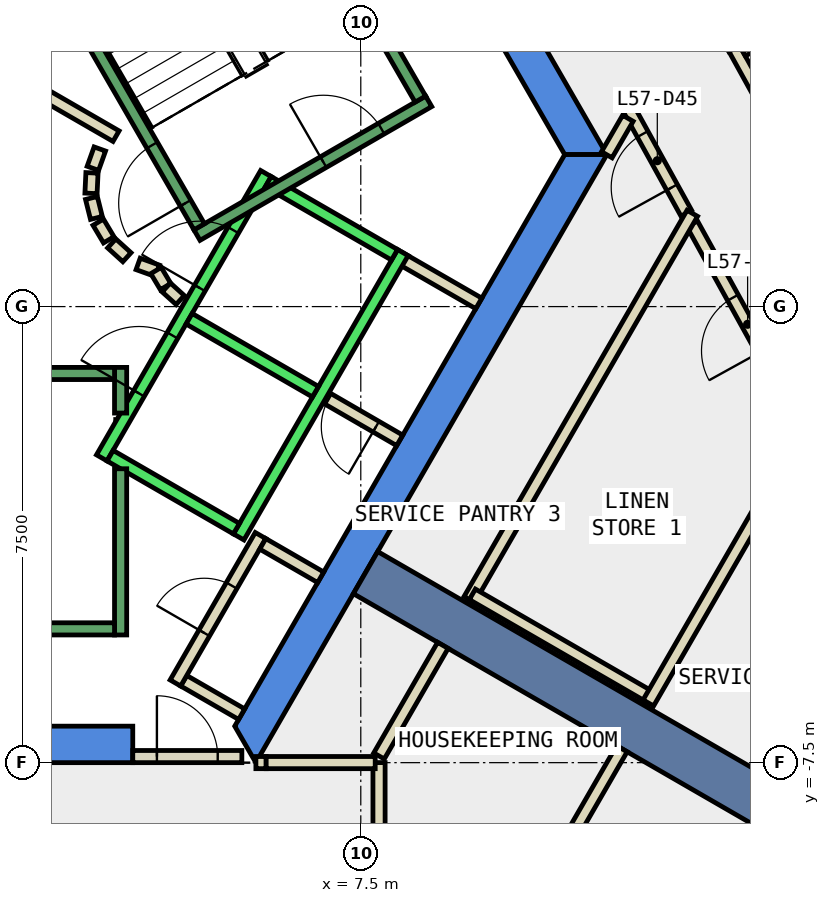
"""IFC4 building model, lengths in metres.
Left out: names, types, materials, properties, quantities, classifications, styles, units other than length and angle.
Written with IfcOpenShell. Run it as: python <this file> out.ifc"""

import sys

from ifc_helpers import new_model, si_unit, direction, frame, frame_2d, origin, place, context, subcontext, project, spatial, polyline, rectangle, outline, extrude, element, fill, save


model = new_model("IFC4")
c1 = context("Model", 3, precision=1e-05, world=origin(), true_north=direction((0.0, 1.0)))
c2 = subcontext(c1, "Body", "Model", "MODEL_VIEW")
j1 = project(units=[si_unit("LENGTHUNIT", "METRE"), si_unit("PLANEANGLEUNIT", "RADIAN")], contexts=[c1])
p1 = place(None, origin())
s1 = spatial("IfcSite", under=j1, at=p1, CompositionType="ELEMENT")
p2 = place(p1, origin())
s2 = spatial("IfcBuilding", under=s1, at=p2, CompositionType="ELEMENT")
p3 = place(p2, frame((0.0, 0.0, 252.2)))
s3 = spatial("IfcBuildingStorey", under=s2, at=p3, CompositionType="ELEMENT", Elevation=252.2)
p4 = place(p3, frame((0.0, 0.0, -0.34)))
e1 = element("IfcWall", 1, at=p4, inside=s3, PredefinedType="SHEAR", context=c2, shape_type="SweptSolid", body=[
    extrude(outline(polyline([(6.786, 10.747), (6.266, 10.447), (10.854, 2.5), (11.547, 2.5), (6.786, 10.747)])), origin(), (0.0, 0.0, 1.0), 3.6),
])
p5 = place(p3, frame((0.0, 0.0, -0.34)))
e2 = element("IfcWall", 2, at=p5, inside=s3, PredefinedType="SHEAR", context=c2, shape_type="SweptSolid", body=[
    extrude(outline(polyline([(3.75, -7.5), (3.75, -6.9), (-5.427, -6.9), (-5.774, -7.5), (3.75, -7.5)])), origin(), (0.0, 0.0, 1.0), 3.6),
])
p6 = place(p3, frame((0.0, 0.0, -0.34)))
e3 = element("IfcWall", 3, at=p6, inside=s3, PredefinedType="SHEAR", context=c2, shape_type="SweptSolid", body=[
    extrude(outline(polyline([(5.774, -7.5), (11.547, 2.5), (10.854, 2.5), (5.427, -6.9), (5.774, -7.5)])), origin(), (0.0, 0.0, 1.0), 3.6),
])
p7 = place(p3, frame((7.578, -4.375, -0.34), z_axis=(0.0, 0.0, 1.0), x_axis=(0.866024315419, -0.5000018851, 0.0)))
e4 = element("IfcWall", 4, at=p7, inside=s3, PredefinedType="SHEAR", context=c2, shape_type="SweptSolid", body=[
    extrude(rectangle(XDim=9.0, YDim=0.8, at=frame_2d((4.5, 0.0))), origin(), (0.0, 0.0, 1.0), 3.6),
])
p8 = place(p3, frame((12.854, 1.535, 0.0), z_axis=(0.0, 0.0, 1.0), x_axis=(-0.483730980407, 0.875216738068, 0.0)))
e5 = element("IfcWall", 5, at=p8, inside=s3, PredefinedType="PARTITIONING", context=c2, shape_type="SweptSolid", body=[
    extrude(rectangle(XDim=1.974, YDim=0.2, at=frame_2d((0.987, 0.0))), origin(), (0.0, 0.0, 1.0), 3.26),
])
p9 = place(p8, frame((0.487, 0.0, 0.0)))
e6 = element("IfcOpeningElement", 6, at=p9, cuts=e5, PredefinedType="OPENING", context=c2, shape_type="SweptSolid", body=[
    extrude(rectangle(XDim=1.0, YDim=2.1, at=frame_2d((0.5, 1.05))), frame((0.0, 0.11, 0.0), z_axis=(0.0, -1.0, 0.0), x_axis=(1.0, 0.0, 0.0)), (0.0, 0.0, 1.0), 0.22),
])
p10 = place(p3, frame((11.893, 3.097, 0.0), z_axis=(0.0, 0.0, 1.0), x_axis=(-0.500911294014, -0.865498628265, 0.0)))
e7 = element("IfcWall", 7, at=p10, inside=s3, PredefinedType="PARTITIONING", context=c2, shape_type="SweptSolid", body=[
    extrude(rectangle(XDim=0.693, YDim=0.2, at=frame_2d((0.347, 0.0))), origin(), (0.0, 0.0, 1.0), 3.26),
])
p11 = place(p3, frame((14.773, -1.941, 0.0), z_axis=(0.0, 0.0, 1.0), x_axis=(-0.483431586589, 0.875382145744, 0.0)))
e8 = element("IfcWall", 8, at=p11, inside=s3, PredefinedType="PARTITIONING", context=c2, shape_type="SweptSolid", body=[
    extrude(rectangle(XDim=3.771, YDim=0.2, at=frame_2d((1.885, 0.0))), origin(), (0.0, 0.0, 1.0), 3.26),
])
p12 = place(p11, frame((1.385, 0.0, 0.0)))
e9 = element("IfcOpeningElement", 9, at=p12, cuts=e8, PredefinedType="OPENING", context=c2, shape_type="SweptSolid", body=[
    extrude(rectangle(XDim=1.0, YDim=2.1, at=frame_2d((0.5, 1.05))), frame((0.0, 0.11, 0.0), z_axis=(0.0, -1.0, 0.0), x_axis=(1.0, 0.0, 0.0)), (0.0, 0.0, 1.0), 0.22),
])
p13 = place(p3, frame((13.641, 4.246, 0.0), z_axis=(0.0, 0.0, 1.0), x_axis=(0.483405752983, -0.875396411909, 0.0)))
e10 = element("IfcWall", 10, at=p13, inside=s3, PredefinedType="PARTITIONING", context=c2, shape_type="SweptSolid", body=[
    extrude(rectangle(XDim=4.284, YDim=0.2, at=frame_2d((2.142, 0.0))), origin(), (0.0, 0.0, 1.0), 3.26),
])
p14 = place(p13, frame((1.692, 0.0, 0.0)))
e11 = element("IfcOpeningElement", 11, at=p14, cuts=e10, PredefinedType="OPENING", context=c2, shape_type="SweptSolid", body=[
    extrude(rectangle(XDim=1.0, YDim=2.1, at=frame_2d((0.5, 1.05))), frame((0.0, 0.11, 0.0), z_axis=(0.0, -1.0, 0.0), x_axis=(1.0, 0.0, 0.0)), (0.0, 0.0, 1.0), 0.22),
])
p15 = place(p3, frame((5.541, -6.703, 0.0), z_axis=(0.0, 0.0, 1.0), x_axis=(-0.86621513555, 0.499671230855, 0.0)))
e12 = element("IfcWall", 12, at=p15, inside=s3, PredefinedType="PARTITIONING", context=c2, shape_type="SweptSolid", body=[
    extrude(rectangle(XDim=1.1, YDim=0.2, at=frame_2d((0.55, 0.0))), origin(), (0.0, 0.0, 1.0), 3.26),
])
p16 = place(p3, frame((4.451, -6.19, 0.0), z_axis=(0.0, 0.0, 1.0), x_axis=(0.500011755427, 0.866018616679, 0.0)))
e13 = element("IfcWall", 13, at=p16, inside=s3, PredefinedType="PARTITIONING", context=c2, shape_type="SweptSolid", body=[
    extrude(rectangle(XDim=2.8, YDim=0.2, at=frame_2d((1.4, 0.0))), origin(), (0.0, 0.0, 1.0), 3.26),
])
p17 = place(p16, frame((0.95, 0.0, 0.0)))
e14 = element("IfcOpeningElement", 14, at=p17, cuts=e13, PredefinedType="OPENING", context=c2, shape_type="SweptSolid", body=[
    extrude(rectangle(XDim=0.9, YDim=2.1, at=frame_2d((0.45, 1.05))), frame((0.0, 0.11, 0.0), z_axis=(0.0, -1.0, 0.0), x_axis=(1.0, 0.0, 0.0)), (0.0, 0.0, 1.0), 0.22),
])
p18 = place(p3, frame((5.888, -3.902, 0.0), z_axis=(0.0, 0.0, 1.0), x_axis=(0.86621513555, -0.499671230855, 0.0)))
e15 = element("IfcWall", 15, at=p18, inside=s3, PredefinedType="PARTITIONING", context=c2, shape_type="SweptSolid", body=[
    extrude(rectangle(XDim=1.1, YDim=0.2, at=frame_2d((0.55, 0.0))), origin(), (0.0, 0.0, 1.0), 3.26),
])
p19 = place(p3, frame((8.14, -2.2, 0.0), z_axis=(0.0, 0.0, 1.0), x_axis=(-0.865545166185, 0.500830874941, 0.0)))
e16 = element("IfcWall", 16, at=p19, inside=s3, PredefinedType="PARTITIONING", context=c2, shape_type="SweptSolid", body=[
    extrude(rectangle(XDim=1.5, YDim=0.2, at=frame_2d((0.75, 0.0))), origin(), (0.0, 0.0, 1.0), 3.26),
])
p20 = place(p19, frame((0.45, 0.0, 0.0)))
e17 = element("IfcOpeningElement", 17, at=p20, cuts=e16, PredefinedType="OPENING", context=c2, shape_type="SweptSolid", body=[
    extrude(rectangle(XDim=0.9, YDim=2.1, at=frame_2d((0.45, 1.05))), frame((0.0, 0.11, 0.0), z_axis=(0.0, -1.0, 0.0), x_axis=(1.0, 0.0, 0.0)), (0.0, 0.0, 1.0), 0.22),
])
p21 = place(p3, frame((8.141, 0.801, 0.0), z_axis=(0.0, 0.0, 1.0), x_axis=(0.866434738017, -0.499290341141, 0.0)))
e18 = element("IfcWall", 18, at=p21, inside=s3, PredefinedType="PARTITIONING", context=c2, shape_type="SweptSolid", body=[
    extrude(rectangle(XDim=1.5, YDim=0.2, at=frame_2d((0.75, 0.0))), origin(), (0.0, 0.0, 1.0), 3.26),
])
p22 = place(p3, frame((5.775, -7.499, 0.0), z_axis=(0.0, 0.0, 1.0), x_axis=(1.0, 0.0, 0.0)))
e19 = element("IfcWall", 19, at=p22, inside=s3, PredefinedType="PARTITIONING", context=c2, shape_type="SweptSolid", body=[
    extrude(rectangle(XDim=0.169, YDim=0.2, at=frame_2d((0.084, 0.0))), origin(), (0.0, 0.0, 1.0), 2.4),
])
p23 = place(p3, frame((7.8, -7.39, 0.0), z_axis=(0.0, 0.0, 1.0), x_axis=(0.499977374825, 0.866038466041, 0.0)))
e20 = element("IfcWall", 20, at=p23, inside=s3, PredefinedType="PARTITIONING", context=c2, shape_type="SweptSolid", body=[
    extrude(rectangle(XDim=2.1, YDim=0.2, at=frame_2d((1.05, 0.0))), origin(), (0.0, 0.0, 1.0), 3.26),
])
p24 = place(p3, frame((9.285, -4.818, 0.0), z_axis=(0.0, 0.0, 1.0), x_axis=(0.499962569651, 0.866047013128, 0.0)))
e21 = element("IfcWall", 21, at=p24, inside=s3, PredefinedType="PARTITIONING", context=c2, shape_type="SweptSolid", body=[
    extrude(rectangle(XDim=7.334, YDim=0.2, at=frame_2d((3.667, 0.0))), origin(), (0.0, 0.0, 1.0), 3.26),
])
p25 = place(p3, frame((1.866, 3.732, 0.0), z_axis=(0.0, 0.0, 1.0), x_axis=(0.866043361281, -0.499968895414, 0.0)))
e22 = element("IfcWall", 22, at=p25, inside=s3, PredefinedType="PARTITIONING", context=c2, shape_type="SweptSolid", body=[
    extrude(rectangle(XDim=1.858, YDim=0.2, at=frame_2d((0.929, 0.0))), origin(), (0.0, 0.0, 1.0), 3.26),
])
p26 = place(p3, frame((3.208, 2.592, 0.0), z_axis=(0.0, 0.0, 1.0), x_axis=(-0.337388820924, -0.941365382578, 0.0)))
e23 = element("IfcWall", 23, at=p26, inside=s3, PredefinedType="PARTITIONING", context=c2, shape_type="SweptSolid", body=[
    extrude(rectangle(XDim=0.338, YDim=0.2, at=frame_2d((0.169, 0.0))), origin(), (0.0, 0.0, 1.0), 3.26),
])
p27 = place(p3, frame((3.079, 2.199, 0.0), z_axis=(0.0, 0.0, 1.0), x_axis=(-0.047771483479, -0.998858290933, 0.0)))
e24 = element("IfcWall", 24, at=p27, inside=s3, PredefinedType="PARTITIONING", context=c2, shape_type="SweptSolid", body=[
    extrude(rectangle(XDim=0.337, YDim=0.2, at=frame_2d((0.169, 0.0))), origin(), (0.0, 0.0, 1.0), 3.26),
])
p28 = place(p3, frame((3.07, 1.786, 0.0), z_axis=(0.0, 0.0, 1.0), x_axis=(0.242705583207, -0.970099994784, 0.0)))
e25 = element("IfcWall", 25, at=p28, inside=s3, PredefinedType="PARTITIONING", context=c2, shape_type="SweptSolid", body=[
    extrude(rectangle(XDim=0.338, YDim=0.2, at=frame_2d((0.169, 0.0))), origin(), (0.0, 0.0, 1.0), 3.26),
])
for number, where, z_axis, x_axis in (
    (26, (3.182, 1.388, 0.0), (0.0, 0.0, 1.0), (0.512, -0.859, 0.0)),
    (27, (3.404, 1.039, 0.0), (0.0, 0.0, 1.0), (0.74, -0.672, 0.0)),
):
    element("IfcWall", number, at=place(p3, frame(where, z_axis=z_axis, x_axis=x_axis)), inside=s3, PredefinedType="PARTITIONING", context=c2, shape_type="SweptSolid", body=[
        extrude(rectangle(XDim=0.338, YDim=0.2, at=frame_2d((0.169, 0.0))), origin(), (0.0, 0.0, 1.0), 3.26),
    ])
p29 = place(p3, frame((3.838, 0.702, 0.0), z_axis=(0.0, 0.0, 1.0), x_axis=(0.941035081519, -0.338308993895, 0.0)))
e28 = element("IfcWall", 28, at=p29, inside=s3, PredefinedType="PARTITIONING", context=c2, shape_type="SweptSolid", body=[
    extrude(rectangle(XDim=0.337, YDim=0.2, at=frame_2d((0.168, 0.0))), origin(), (0.0, 0.0, 1.0), 3.26),
])
p30 = place(p3, frame((4.132, 0.593, 0.0), z_axis=(0.0, 0.0, 1.0), x_axis=(0.513561617048, -0.858052717201, 0.0)))
e29 = element("IfcWall", 29, at=p30, inside=s3, PredefinedType="PARTITIONING", context=c2, shape_type="SweptSolid", body=[
    extrude(rectangle(XDim=0.308, YDim=0.2, at=frame_2d((0.154, 0.0))), origin(), (0.0, 0.0, 1.0), 3.26),
])
p31 = place(p3, frame((4.301, 0.315, 0.0), z_axis=(0.0, 0.0, 1.0), x_axis=(0.741798017506, -0.670623367639, 0.0)))
e30 = element("IfcWall", 30, at=p31, inside=s3, PredefinedType="PARTITIONING", context=c2, shape_type="SweptSolid", body=[
    extrude(rectangle(XDim=0.309, YDim=0.2, at=frame_2d((0.154, 0.0))), origin(), (0.0, 0.0, 1.0), 3.26),
])
p32 = place(p3, frame((7.8, -7.499, 0.0), z_axis=(0.0, 0.0, 1.0), x_axis=(0.0, -1.0, 0.0)))
e31 = element("IfcWall", 31, at=p32, inside=s3, PredefinedType="PARTITIONING", context=c2, shape_type="SweptSolid", body=[
    extrude(rectangle(XDim=4.685, YDim=0.2, at=frame_2d((2.343, 0.0))), origin(), (0.0, 0.0, 1.0), 3.26),
])
p33 = place(p32, frame((1.842, 0.0, 0.0)))
e32 = element("IfcOpeningElement", 32, at=p33, cuts=e31, PredefinedType="OPENING", context=c2, shape_type="SweptSolid", body=[
    extrude(rectangle(XDim=1.0, YDim=2.1, at=frame_2d((0.5, 1.05))), frame((0.0, 0.11, 0.0), z_axis=(0.0, -1.0, 0.0), x_axis=(1.0, 0.0, 0.0)), (0.0, 0.0, 1.0), 0.22),
])
p34 = place(p3, frame((9.335, -4.732, 0.0), z_axis=(0.0, 0.0, 1.0), x_axis=(0.866002606077, -0.500039484709, 0.0)))
e33 = element("IfcWall", 33, at=p34, inside=s3, PredefinedType="PARTITIONING", context=c2, shape_type="SweptSolid", body=[
    extrude(rectangle(XDim=3.4, YDim=0.2, at=frame_2d((1.7, 0.0))), origin(), (0.0, 0.0, 1.0), 3.26),
])
p35 = place(p3, frame((11.794, -7.271, 0.0), z_axis=(0.0, 0.0, 1.0), x_axis=(-0.499918457185, -0.866072477433, 0.0)))
e34 = element("IfcWall", 34, at=p35, inside=s3, PredefinedType="PARTITIONING", context=c2, shape_type="SweptSolid", body=[
    extrude(rectangle(XDim=5.607, YDim=0.2, at=frame_2d((2.803, 0.0))), origin(), (0.0, 0.0, 1.0), 3.26),
])
p36 = place(p3, frame((14.871, -1.942, 0.0), z_axis=(0.0, 0.0, 1.0), x_axis=(-0.50000507839, -0.866022471755, 0.0)))
e35 = element("IfcWall", 35, at=p36, inside=s3, PredefinedType="PARTITIONING", context=c2, shape_type="SweptSolid", body=[
    extrude(rectangle(XDim=5.284, YDim=0.2, at=frame_2d((2.642, 0.0))), origin(), (0.0, 0.0, 1.0), 3.26),
])
p37 = place(p3, frame((13.776, 4.208, 0.0), z_axis=(0.0, 0.0, 1.0), x_axis=(0.870669592898, 0.491868336044, 0.0)))
e36 = element("IfcWall", 36, at=p37, inside=s3, PredefinedType="PARTITIONING", context=c2, shape_type="SweptSolid", body=[
    extrude(rectangle(XDim=2.3, YDim=0.2, at=frame_2d((1.15, 0.0))), origin(), (0.0, 0.0, 1.0), 3.26),
])
p38 = place(p3, frame((3.75, -7.4, 0.0), z_axis=(0.0, 0.0, 1.0), x_axis=(1.0, 0.0, 0.0)))
e37 = element("IfcWall", 37, at=p38, inside=s3, PredefinedType="PARTITIONING", context=c2, shape_type="SweptSolid", body=[
    extrude(rectangle(XDim=1.794, YDim=0.2, at=frame_2d((0.897, 0.0))), origin(), (0.0, 0.0, 1.0), 2.4),
])
p39 = place(p38, frame((0.397, 0.0, 0.0)))
e38 = element("IfcOpeningElement", 38, at=p39, cuts=e37, PredefinedType="OPENING", context=c2, shape_type="SweptSolid", body=[
    extrude(rectangle(XDim=1.0, YDim=2.1, at=frame_2d((0.5, 1.05))), frame((0.0, 0.11, 0.0), z_axis=(0.0, -1.0, 0.0), x_axis=(1.0, 0.0, 0.0)), (0.0, 0.0, 1.0), 0.22),
])
p40 = place(p3, frame((5.944, -7.499, 0.0), z_axis=(0.0, 0.0, 1.0), x_axis=(1.0, 0.0, 0.0)))
e39 = element("IfcWall", 39, at=p40, inside=s3, PredefinedType="PARTITIONING", context=c2, shape_type="SweptSolid", body=[
    extrude(rectangle(XDim=1.793, YDim=0.2, at=frame_2d((0.896, 0.0))), origin(), (0.0, 0.0, 1.0), 3.26),
])
p41 = place(p3, frame((3.24, -2.488, 0.0), z_axis=(0.0, 0.0, 1.0), x_axis=(0.500034260056, 0.866005622828, 0.0)))
e40 = element("IfcWall", 40, at=p41, inside=s3, PredefinedType="STANDARD", context=c2, shape_type="SweptSolid", body=[
    extrude(rectangle(XDim=5.399, YDim=0.2, at=frame_2d((2.7, 0.0))), origin(), (0.0, 0.0, 1.0), 3.26),
])
p42 = place(p41, frame((3.225, 0.0, 0.0)))
e41 = element("IfcOpeningElement", 41, at=p42, cuts=e40, PredefinedType="OPENING", context=c2, shape_type="SweptSolid", body=[
    extrude(rectangle(XDim=1.1, YDim=2.1, at=frame_2d((0.55, 1.05))), frame((0.0, 0.11, 0.0), z_axis=(0.0, -1.0, 0.0), x_axis=(1.0, 0.0, 0.0)), (0.0, 0.0, 1.0), 0.22),
])
p43 = place(p41, frame((1.225, 0.0, 0.0)))
e42 = element("IfcOpeningElement", 42, at=p43, cuts=e40, PredefinedType="OPENING", context=c2, shape_type="SweptSolid", body=[
    extrude(rectangle(XDim=1.1, YDim=2.1, at=frame_2d((0.55, 1.05))), frame((0.0, 0.11, 0.0), z_axis=(0.0, -1.0, 0.0), x_axis=(1.0, 0.0, 0.0)), (0.0, 0.0, 1.0), 0.22),
])
p44 = place(p3, frame((5.492, -3.788, 0.0), z_axis=(0.0, 0.0, 1.0), x_axis=(0.500034260056, 0.866005622828, 0.0)))
e43 = element("IfcWall", 43, at=p44, inside=s3, PredefinedType="STANDARD", context=c2, shape_type="SweptSolid", body=[
    extrude(rectangle(XDim=5.399, YDim=0.2, at=frame_2d((2.7, 0.0))), origin(), (0.0, 0.0, 1.0), 3.26),
])
p45 = place(p3, frame((3.377, -2.452, 0.0), z_axis=(0.0, 0.0, 1.0), x_axis=(0.865955154139, -0.50012165622, 0.0)))
e44 = element("IfcWall", 44, at=p45, inside=s3, PredefinedType="STANDARD", context=c2, shape_type="SweptSolid", body=[
    extrude(rectangle(XDim=2.4, YDim=0.2, at=frame_2d((1.2, 0.0))), origin(), (0.0, 0.0, 1.0), 3.26),
])
for number, where, z_axis, x_axis in (
    (45, (4.677, -0.2, 0.0), (0.0, 0.0, 1.0), (0.866, -0.5, 0.0)),
    (46, (5.977, 2.052, 0.0), (0.0, 0.0, 1.0), (0.866, -0.5, 0.0)),
):
    element("IfcWall", number, at=place(p3, frame(where, z_axis=z_axis, x_axis=x_axis)), inside=s3, PredefinedType="STANDARD", context=c2, shape_type="SweptSolid", body=[
        extrude(rectangle(XDim=2.399, YDim=0.2, at=frame_2d((1.2, 0.0))), origin(), (0.0, 0.0, 1.0), 3.26),
    ])
p46 = place(p3, frame((3.55, -2.667, 0.0), z_axis=(0.0, 0.0, 1.0), x_axis=(0.0, -1.0, 0.0)))
e47 = element("IfcWall", 47, at=p46, inside=s3, PredefinedType="STANDARD", context=c2, shape_type="SweptSolid", body=[
    extrude(rectangle(XDim=2.733, YDim=0.2, at=frame_2d((1.366, 0.0))), origin(), (0.0, 0.0, 1.0), 3.26),
])
p47 = place(p3, frame((3.55, -1.0, 0.0), z_axis=(0.0, 0.0, 1.0), x_axis=(0.0, -1.0, 0.0)))
e48 = element("IfcWall", 48, at=p47, inside=s3, PredefinedType="STANDARD", context=c2, shape_type="SweptSolid", body=[
    extrude(rectangle(XDim=0.751, YDim=0.2, at=frame_2d((0.375, 0.0))), origin(), (0.0, 0.0, 1.0), 3.26),
])
p48 = place(p3, frame((-3.45, -1.1, 0.0), z_axis=(0.0, 0.0, 1.0), x_axis=(1.0, 0.0, 0.0)))
e49 = element("IfcWall", 49, at=p48, inside=s3, PredefinedType="STANDARD", context=c2, shape_type="SweptSolid", body=[
    extrude(rectangle(XDim=6.9, YDim=0.2, at=frame_2d((3.45, 0.0))), origin(), (0.0, 0.0, 1.0), 3.26),
])
p49 = place(p48, frame((0.45, 0.0, 0.0)))
e50 = element("IfcOpeningElement", 50, at=p49, cuts=e49, PredefinedType="OPENING", context=c2, shape_type="SweptSolid", body=[
    extrude(rectangle(XDim=1.1, YDim=2.2, at=frame_2d((0.55, 1.1))), frame((0.0, 0.11, 0.0), z_axis=(0.0, -1.0, 0.0), x_axis=(1.0, 0.0, 0.0)), (0.0, 0.0, 1.0), 0.22),
])
p50 = place(p3, frame((-3.45, -5.3, 0.0), z_axis=(0.0, 0.0, 1.0), x_axis=(1.0, 0.0, 0.0)))
e51 = element("IfcWall", 51, at=p50, inside=s3, PredefinedType="STANDARD", context=c2, shape_type="SweptSolid", body=[
    extrude(rectangle(XDim=6.9, YDim=0.2, at=frame_2d((3.45, 0.0))), origin(), (0.0, 0.0, 1.0), 3.26),
])
p51 = place(p3, frame((4.806, 1.176, 0.0), z_axis=(0.0, 0.0, 1.0), x_axis=(0.866059941101, 0.499940174841, 0.0)))
e52 = element("IfcWall", 52, at=p51, inside=s3, PredefinedType="STANDARD", context=c2, shape_type="SweptSolid", body=[
    extrude(rectangle(XDim=4.4, YDim=0.2, at=frame_2d((2.2, 0.0))), origin(), (0.0, 0.0, 1.0), 3.26),
])
p52 = place(p51, frame((2.4, 0.0, 0.0)))
e53 = element("IfcOpeningElement", 53, at=p52, cuts=e52, PredefinedType="OPENING", context=c2, shape_type="SweptSolid", body=[
    extrude(rectangle(XDim=1.1, YDim=2.2, at=frame_2d((0.55, 1.1))), frame((0.0, 0.11, 0.0), z_axis=(0.0, -1.0, 0.0), x_axis=(1.0, 0.0, 0.0)), (0.0, 0.0, 1.0), 0.22),
])
p53 = place(p3, frame((4.843, 1.312, 0.0), z_axis=(0.0, 0.0, 1.0), x_axis=(-0.499963383562, 0.866046543262, 0.0)))
e54 = element("IfcWall", 54, at=p53, inside=s3, PredefinedType="STANDARD", context=c2, shape_type="SweptSolid", body=[
    extrude(rectangle(XDim=6.9, YDim=0.2, at=frame_2d((3.45, 0.0))), origin(), (0.0, 0.0, 1.0), 3.26),
])
p54 = place(p53, frame((0.45, 0.0, 0.0)))
e55 = element("IfcOpeningElement", 55, at=p54, cuts=e54, PredefinedType="OPENING", context=c2, shape_type="SweptSolid", body=[
    extrude(rectangle(XDim=1.1, YDim=2.2, at=frame_2d((0.55, 1.1))), frame((0.0, 0.11, 0.0), z_axis=(0.0, -1.0, 0.0), x_axis=(1.0, 0.0, 0.0)), (0.0, 0.0, 1.0), 0.22),
])
p55 = place(p3, frame((8.48, 3.412, 0.0), z_axis=(0.0, 0.0, 1.0), x_axis=(-0.499978703459, 0.866037698999, 0.0)))
e56 = element("IfcWall", 56, at=p55, inside=s3, PredefinedType="STANDARD", context=c2, shape_type="SweptSolid", body=[
    extrude(rectangle(XDim=6.9, YDim=0.2, at=frame_2d((3.45, 0.0))), origin(), (0.0, 0.0, 1.0), 3.26),
])
p56 = place(p12, origin())
e57 = element("IfcDoor", 57, at=p56, inside=s3, OperationType="SINGLE_SWING_LEFT", PredefinedType="DOOR", context=c2, shape_type="SweptSolid", body=[
    extrude(rectangle(XDim=1.0, YDim=2.1, at=frame_2d((0.5, 1.05))), frame((0.0, 0.025, 0.0), z_axis=(0.0, -1.0, 0.0), x_axis=(1.0, 0.0, 0.0)), (0.0, 0.0, 1.0), 0.05),
])
fill(e9, e57)
p57 = place(p9, origin())
e58 = element("IfcDoor", 58, at=p57, inside=s3, OperationType="SINGLE_SWING_LEFT", PredefinedType="DOOR", context=c2, shape_type="SweptSolid", body=[
    extrude(rectangle(XDim=1.0, YDim=2.1, at=frame_2d((0.5, 1.05))), frame((0.0, 0.025, 0.0), z_axis=(0.0, -1.0, 0.0), x_axis=(1.0, 0.0, 0.0)), (0.0, 0.0, 1.0), 0.05),
])
fill(e6, e58)
p58 = place(p17, origin())
e59 = element("IfcDoor", 59, at=p58, inside=s3, OperationType="SINGLE_SWING_LEFT", PredefinedType="DOOR", context=c2, shape_type="SweptSolid", body=[
    extrude(rectangle(XDim=0.9, YDim=2.1, at=frame_2d((0.45, 1.05))), frame((0.0, 0.025, 0.0), z_axis=(0.0, -1.0, 0.0), x_axis=(1.0, 0.0, 0.0)), (0.0, 0.0, 1.0), 0.05),
])
fill(e14, e59)
p59 = place(p20, origin())
e60 = element("IfcDoor", 60, at=p59, inside=s3, OperationType="SINGLE_SWING_LEFT", PredefinedType="DOOR", context=c2, shape_type="SweptSolid", body=[
    extrude(rectangle(XDim=0.9, YDim=2.1, at=frame_2d((0.45, 1.05))), frame((0.0, 0.025, 0.0), z_axis=(0.0, -1.0, 0.0), x_axis=(1.0, 0.0, 0.0)), (0.0, 0.0, 1.0), 0.05),
])
fill(e17, e60)
p60 = place(p39, origin())
e61 = element("IfcDoor", 61, at=p60, inside=s3, OperationType="SINGLE_SWING_LEFT", PredefinedType="DOOR", context=c2, shape_type="SweptSolid", body=[
    extrude(rectangle(XDim=1.0, YDim=2.1, at=frame_2d((0.5, 1.05))), frame((0.0, 0.025, 0.0), z_axis=(0.0, -1.0, 0.0), x_axis=(1.0, 0.0, 0.0)), (0.0, 0.0, 1.0), 0.05),
])
fill(e38, e61)
p61 = place(p42, origin())
e62 = element("IfcDoor", 62, at=p61, inside=s3, OperationType="SLIDING_TO_LEFT", PredefinedType="DOOR", context=c2, shape_type="SweptSolid", body=[
    extrude(rectangle(XDim=1.1, YDim=2.1, at=frame_2d((0.55, 1.05))), frame((0.0, 0.025, 0.0), z_axis=(0.0, -1.0, 0.0), x_axis=(1.0, 0.0, 0.0)), (0.0, 0.0, 1.0), 0.05),
])
fill(e41, e62)
p62 = place(p43, origin())
e63 = element("IfcDoor", 63, at=p62, inside=s3, OperationType="SLIDING_TO_LEFT", PredefinedType="DOOR", context=c2, shape_type="SweptSolid", body=[
    extrude(rectangle(XDim=1.1, YDim=2.1, at=frame_2d((0.55, 1.05))), frame((0.0, 0.025, 0.0), z_axis=(0.0, -1.0, 0.0), x_axis=(1.0, 0.0, 0.0)), (0.0, 0.0, 1.0), 0.05),
])
fill(e42, e63)
p63 = place(p54, origin())
e64 = element("IfcDoor", 64, at=p63, inside=s3, OperationType="SINGLE_SWING_LEFT", PredefinedType="DOOR", context=c2, shape_type="SweptSolid", body=[
    extrude(rectangle(XDim=1.1, YDim=2.2, at=frame_2d((0.55, 1.1))), frame((0.0, 0.025, 0.0), z_axis=(0.0, -1.0, 0.0), x_axis=(1.0, 0.0, 0.0)), (0.0, 0.0, 1.0), 0.05),
])
fill(e55, e64)
p64 = place(p52, origin())
e65 = element("IfcDoor", 65, at=p64, inside=s3, OperationType="SINGLE_SWING_LEFT", PredefinedType="DOOR", context=c2, shape_type="SweptSolid", body=[
    extrude(rectangle(XDim=1.1, YDim=2.2, at=frame_2d((0.55, 1.1))), frame((0.0, 0.025, 0.0), z_axis=(0.0, -1.0, 0.0), x_axis=(1.0, 0.0, 0.0)), (0.0, 0.0, 1.0), 0.05),
])
fill(e53, e65)
save(model, sys.argv[1])
